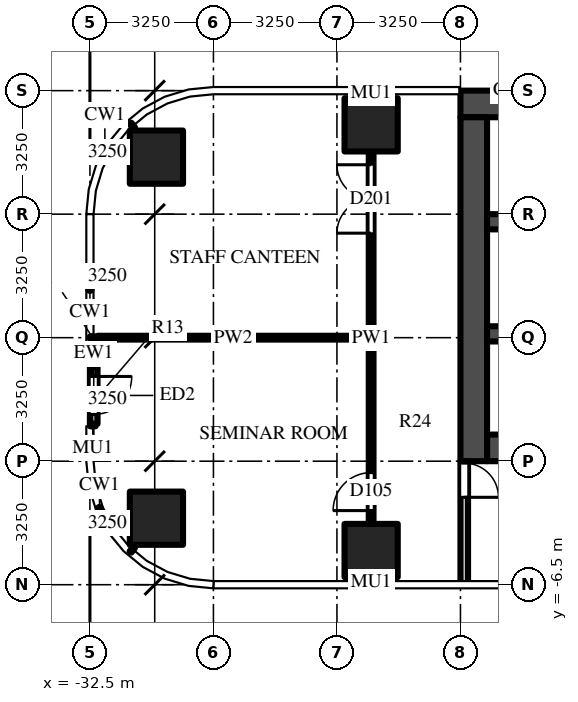
"""IFC4 building model, lengths in metres.
Left out: names, types, materials, properties, quantities, classifications, styles, units other than length and angle.
Written with IfcOpenShell. Run it as: python <this file> out.ifc"""

import sys

from ifc_helpers import new_model, si_unit, direction, frame, frame_2d, origin, origin_2d, place, context, subcontext, project, spatial, rectangle, extrude, source, transform, mapped, element, fill, save


model = new_model("IFC4")
c1 = context("Model", 3, precision=1e-05, world=origin(), true_north=direction((0.0, 1.0)))
c2 = subcontext(c1, "Body", "Model", "MODEL_VIEW")
j1 = project(units=[si_unit("LENGTHUNIT", "METRE"), si_unit("PLANEANGLEUNIT", "RADIAN")], contexts=[c1])
p1 = place(None, origin())
s1 = spatial("IfcSite", under=j1, at=p1, CompositionType="ELEMENT")
p2 = place(p1, origin())
s2 = spatial("IfcBuilding", under=s1, at=p2, CompositionType="ELEMENT")
p3 = place(p2, frame((0.0, 0.0, 34.0)))
s3 = spatial("IfcBuildingStorey", under=s2, at=p3, CompositionType="ELEMENT", Elevation=34.0)
m1 = source(origin(), c2, "Body", "SweptSolid", [
    extrude(rectangle(XDim=1.4, YDim=1.4, at=origin_2d()), origin(), (0.0, 0.0, 1.0), 4.5),
])
for number, where, z_axis, x_axis in (
    (1, (-25.1, -5.6, 0.0), (0.0, 0.0, 1.0), (1.0, 0.0, 0.0)),
    (2, (-30.75, -4.75, 0.0), (0.0, 0.0, 1.0), (1.0, 0.0, 0.0)),
    (3, (-25.1, 5.6, 0.0), (0.0, 0.0, 1.0), (1.0, 0.0, 0.0)),
    (4, (-30.75, 4.75, 0.0), (0.0, 0.0, 1.0), (1.0, 0.0, 0.0)),
):
    element("IfcColumn", number, at=place(p3, frame(where, z_axis=z_axis, x_axis=x_axis)), inside=s3, PredefinedType="COLUMN", context=c2, shape_type="MappedRepresentation", body=[
        mapped(m1, transform((0.0, 0.0, 0.0))),
    ])
m2 = source(origin(), c2, "Body", "SweptSolid", [
    extrude(rectangle(XDim=16.45, YDim=0.7, at=frame_2d((8.225, 0.0))), origin(), (0.0, 0.0, 1.0), 4.25),
])
p4 = place(p3, frame((-6.3, 6.15, 0.0), z_axis=(0.0, 0.0, 1.0), x_axis=(-1.0, 0.0, 0.0)))
e5 = element("IfcWall", 5, at=p4, inside=s3, PredefinedType="SHEAR", context=c2, shape_type="MappedRepresentation", body=[
    mapped(m2, transform((0.0, 0.0, 0.0))),
])
m3 = source(origin(), c2, "Body", "SweptSolid", [
    extrude(rectangle(XDim=14.85, YDim=0.7, at=frame_2d((7.425, 0.0))), origin(), (0.0, 0.0, 1.0), 4.25),
])
p5 = place(p3, frame((-7.2, -2.9, 0.0), z_axis=(0.0, 0.0, 1.0), x_axis=(-1.0, 0.0, 0.0)))
e6 = element("IfcWall", 6, at=p5, inside=s3, PredefinedType="SHEAR", context=c2, shape_type="MappedRepresentation", body=[
    mapped(m3, transform((0.0, 0.0, 0.0))),
])
m4 = source(origin(), c2, "Body", "SweptSolid", [
    extrude(rectangle(XDim=1.3, YDim=2.1, at=frame_2d((0.65, 1.05))), frame((0.0, 0.36, 0.0), z_axis=(0.0, -1.0, 0.0), x_axis=(1.0, 0.0, 0.0)), (0.0, 0.0, 1.0), 0.72),
])
p6 = place(p5, frame((12.2, 0.0, 0.0)))
e7 = element("IfcOpeningElement", 7, at=p6, cuts=e6, PredefinedType="OPENING", context=c2, shape_type="MappedRepresentation", body=[
    mapped(m4, transform((0.0, 0.0, 0.0))),
])
m5 = source(origin(), c2, "Body", "SweptSolid", [
    extrude(rectangle(XDim=1.2, YDim=2.1, at=frame_2d((0.6, 1.05))), frame((0.0, 0.36, 0.0), z_axis=(0.0, -1.0, 0.0), x_axis=(1.0, 0.0, 0.0)), (0.0, 0.0, 1.0), 0.72),
])
p7 = place(p5, frame((9.85, 0.0, 0.0)))
e8 = element("IfcOpeningElement", 8, at=p7, cuts=e6, PredefinedType="OPENING", context=c2, shape_type="MappedRepresentation", body=[
    mapped(m5, transform((0.0, 0.0, 0.0))),
])
m6 = source(origin(), c2, "Body", "SweptSolid", [
    extrude(rectangle(XDim=1.0, YDim=2.1, at=frame_2d((0.5, 1.05))), frame((0.0, 0.36, 0.0), z_axis=(0.0, -1.0, 0.0), x_axis=(1.0, 0.0, 0.0)), (0.0, 0.0, 1.0), 0.72),
])
p8 = place(p5, frame((7.9, 0.0, 0.0)))
e9 = element("IfcOpeningElement", 9, at=p8, cuts=e6, PredefinedType="OPENING", context=c2, shape_type="MappedRepresentation", body=[
    mapped(m6, transform((0.0, 0.0, 0.0))),
])
m7 = source(origin(), c2, "Body", "SweptSolid", [
    extrude(rectangle(XDim=0.9, YDim=2.1, at=frame_2d((0.45, 1.05))), frame((0.0, 0.36, 0.0), z_axis=(0.0, -1.0, 0.0), x_axis=(1.0, 0.0, 0.0)), (0.0, 0.0, 1.0), 0.72),
])
p9 = place(p5, frame((0.65, 0.0, 0.0)))
e10 = element("IfcOpeningElement", 10, at=p9, cuts=e6, PredefinedType="OPENING", context=c2, shape_type="MappedRepresentation", body=[
    mapped(m7, transform((0.0, 0.0, 0.0))),
])
p10 = place(p5, frame((3.25, 0.0, 0.0)))
e11 = element("IfcOpeningElement", 11, at=p10, cuts=e6, PredefinedType="OPENING", context=c2, shape_type="MappedRepresentation", body=[
    mapped(m7, transform((0.0, 0.0, 0.0))),
])
p11 = place(p5, frame((5.8, 0.0, 0.0)))
e12 = element("IfcOpeningElement", 12, at=p11, cuts=e6, PredefinedType="OPENING", context=c2, shape_type="MappedRepresentation", body=[
    mapped(m6, transform((0.0, 0.0, 0.0))),
])
m8 = source(origin(), c2, "Body", "SweptSolid", [
    extrude(rectangle(XDim=9.05, YDim=0.7, at=frame_2d((4.525, 0.0))), origin(), (0.0, 0.0, 1.0), 4.25),
])
p12 = place(p3, frame((-22.4, 5.8, 0.0), z_axis=(0.0, 0.0, 1.0), x_axis=(0.0, -1.0, 0.0)))
e13 = element("IfcWall", 13, at=p12, inside=s3, PredefinedType="SHEAR", context=c2, shape_type="MappedRepresentation", body=[
    mapped(m8, transform((0.0, 0.0, 0.0))),
])
m9 = source(origin(), c2, "Body", "SweptSolid", [
    extrude(rectangle(XDim=14.85, YDim=0.4, at=frame_2d((7.425, 0.0))), origin(), (0.0, 0.0, 1.0), 4.25),
])
p13 = place(p3, frame((-7.2, 0.1, 0.0), z_axis=(0.0, 0.0, 1.0), x_axis=(-1.0, 0.0, 0.0)))
e14 = element("IfcWall", 14, at=p13, inside=s3, PredefinedType="SHEAR", context=c2, shape_type="MappedRepresentation", body=[
    mapped(m9, transform((0.0, 0.0, 0.0))),
])
m10 = source(origin(), c2, "Body", "SweptSolid", [
    extrude(rectangle(XDim=1.0, YDim=2.1, at=frame_2d((0.5, 1.05))), frame((0.0, 0.21, 0.0), z_axis=(0.0, -1.0, 0.0), x_axis=(1.0, 0.0, 0.0)), (0.0, 0.0, 1.0), 0.42),
])
p14 = place(p13, frame((7.9, 0.0, 0.0)))
e15 = element("IfcOpeningElement", 15, at=p14, cuts=e14, PredefinedType="OPENING", context=c2, shape_type="MappedRepresentation", body=[
    mapped(m10, transform((0.0, 0.0, 0.0))),
])
m11 = source(origin(), c2, "Body", "SweptSolid", [
    extrude(rectangle(XDim=5.7, YDim=0.4, at=frame_2d((2.85, 0.0))), origin(), (0.0, 0.0, 1.0), 4.25),
])
p15 = place(p3, frame((-16.35, 3.05, 0.0), z_axis=(0.0, 0.0, 1.0), x_axis=(-1.0, 0.0, 0.0)))
e16 = element("IfcWall", 16, at=p15, inside=s3, PredefinedType="SHEAR", context=c2, shape_type="MappedRepresentation", body=[
    mapped(m11, transform((0.0, 0.0, 0.0))),
])
m12 = source(origin(), c2, "Body", "SweptSolid", [
    extrude(rectangle(XDim=3.25, YDim=0.2, at=frame_2d((1.625, 0.0))), origin(), (0.0, 0.0, 1.0), 4.25),
])
p16 = place(p3, frame((-22.65, -3.25, 0.0), z_axis=(0.0, 0.0, 1.0), x_axis=(0.0, -1.0, 0.0)))
e17 = element("IfcWall", 17, at=p16, inside=s3, PredefinedType="PARTITIONING", context=c2, shape_type="MappedRepresentation", body=[
    mapped(m12, transform((0.0, 0.0, 0.0))),
])
m13 = source(origin(), c2, "Body", "SweptSolid", [
    extrude(rectangle(XDim=0.9, YDim=2.1, at=frame_2d((0.45, 1.05))), frame((0.0, 0.11, 0.0), z_axis=(0.0, -1.0, 0.0), x_axis=(1.0, 0.0, 0.0)), (0.0, 0.0, 1.0), 0.22),
])
p17 = place(p16, frame((0.05, 0.0, 0.0)))
e18 = element("IfcOpeningElement", 18, at=p17, cuts=e17, PredefinedType="OPENING", context=c2, shape_type="MappedRepresentation", body=[
    mapped(m13, transform((0.0, 0.0, 0.0))),
])
m14 = source(origin(), c2, "Body", "SweptSolid", [
    extrude(rectangle(XDim=1.5, YDim=0.2, at=frame_2d((0.75, 0.0))), origin(), (0.0, 0.0, 1.0), 4.25),
])
p18 = place(p3, frame((-32.4, -0.77, 0.0), z_axis=(0.0, 0.0, 1.0), x_axis=(0.0, -1.0, 0.0)))
e19 = element("IfcWall", 19, at=p18, inside=s3, PredefinedType="SOLIDWALL", context=c2, shape_type="MappedRepresentation", body=[
    mapped(m14, transform((0.0, 0.0, 0.0))),
])
m15 = source(origin(), c2, "Body", "SweptSolid", [
    extrude(rectangle(XDim=1.0, YDim=2.4, at=frame_2d((0.5, 1.2))), frame((0.0, 0.11, 0.0), z_axis=(0.0, -1.0, 0.0), x_axis=(1.0, 0.0, 0.0)), (0.0, 0.0, 1.0), 0.22),
])
p19 = place(p18, frame((0.25, 0.0, 0.0)))
e20 = element("IfcOpeningElement", 20, at=p19, cuts=e19, PredefinedType="OPENING", context=c2, shape_type="MappedRepresentation", body=[
    mapped(m15, transform((0.0, 0.0, 0.0))),
])
m16 = source(origin(), c2, "Body", "SweptSolid", [
    extrude(rectangle(XDim=9.8, YDim=0.125, at=frame_2d((4.9, 0.0))), origin(), (0.0, 0.0, 1.0), 3.468),
])
p20 = place(p3, frame((-25.1, -4.9, 0.0), z_axis=(0.0, 0.0, 1.0), x_axis=(0.0, 1.0, 0.0)))
e21 = element("IfcWall", 21, at=p20, inside=s3, PredefinedType="PARTITIONING", context=c2, shape_type="MappedRepresentation", body=[
    mapped(m16, transform((0.0, 0.0, 0.0))),
])
m17 = source(origin(), c2, "Body", "SweptSolid", [
    extrude(rectangle(XDim=1.0, YDim=2.1, at=frame_2d((0.5, 1.05))), frame((0.0, 0.073, 0.0), z_axis=(0.0, -1.0, 0.0), x_axis=(1.0, 0.0, 0.0)), (0.0, 0.0, 1.0), 0.145),
])
p21 = place(p20, frame((0.35, 0.0, 0.0)))
e22 = element("IfcOpeningElement", 22, at=p21, cuts=e21, PredefinedType="OPENING", context=c2, shape_type="MappedRepresentation", body=[
    mapped(m17, transform((0.0, 0.0, 0.0))),
])
m18 = source(origin(), c2, "Body", "SweptSolid", [
    extrude(rectangle(XDim=1.8, YDim=2.1, at=frame_2d((0.9, 1.05))), frame((0.0, 0.073, 0.0), z_axis=(0.0, -1.0, 0.0), x_axis=(1.0, 0.0, 0.0)), (0.0, 0.0, 1.0), 0.145),
])
p22 = place(p20, frame((7.65, 0.0, 0.0)))
e23 = element("IfcOpeningElement", 23, at=p22, cuts=e21, PredefinedType="OPENING", context=c2, shape_type="MappedRepresentation", body=[
    mapped(m18, transform((0.0, 0.0, 0.0))),
])
m19 = source(origin(), c2, "Body", "SweptSolid", [
    extrude(rectangle(XDim=7.137, YDim=0.1, at=frame_2d((3.569, 0.0))), origin(), (0.0, 0.0, 1.0), 3.33),
])
p23 = place(p3, frame((-32.3, 0.0, 0.0), z_axis=(0.0, 0.0, 1.0), x_axis=(1.0, 0.0, 0.0)))
e24 = element("IfcWall", 24, at=p23, inside=s3, PredefinedType="PARTITIONING", context=c2, shape_type="MappedRepresentation", body=[
    mapped(m19, transform((0.0, 0.0, 0.0))),
])
m20 = source(origin(), c2, "Body", "SweptSolid", [
    extrude(rectangle(XDim=0.9, YDim=2.1, at=frame_2d((0.45, 1.05))), frame((0.0, 0.025, 0.0), z_axis=(0.0, -1.0, 0.0), x_axis=(1.0, 0.0, 0.0)), (0.0, 0.0, 1.0), 0.05),
])
p24 = place(p17, origin())
e25 = element("IfcDoor", 25, at=p24, inside=s3, OperationType="SINGLE_SWING_RIGHT", PredefinedType="DOOR", context=c2, shape_type="MappedRepresentation", body=[
    mapped(m20, transform((0.0, 0.0, 0.0))),
])
fill(e18, e25)
m21 = source(origin(), c2, "Body", "SweptSolid", [
    extrude(rectangle(XDim=1.0, YDim=2.4, at=frame_2d((0.5, 1.2))), frame((0.0, 0.025, 0.0), z_axis=(0.0, -1.0, 0.0), x_axis=(1.0, 0.0, 0.0)), (0.0, 0.0, 1.0), 0.05),
])
p25 = place(p19, origin())
e26 = element("IfcDoor", 26, at=p25, inside=s3, OperationType="SINGLE_SWING_LEFT", PredefinedType="DOOR", context=c2, shape_type="MappedRepresentation", body=[
    mapped(m21, transform((0.0, 0.0, 0.0))),
])
fill(e20, e26)
m22 = source(origin(), c2, "Body", "SweptSolid", [
    extrude(rectangle(XDim=1.0, YDim=2.1, at=frame_2d((0.5, 1.05))), frame((0.0, 0.025, 0.0), z_axis=(0.0, -1.0, 0.0), x_axis=(1.0, 0.0, 0.0)), (0.0, 0.0, 1.0), 0.05),
])
p26 = place(p21, origin())
e27 = element("IfcDoor", 27, at=p26, inside=s3, OperationType="SINGLE_SWING_LEFT", PredefinedType="DOOR", context=c2, shape_type="MappedRepresentation", body=[
    mapped(m22, transform((0.0, 0.0, 0.0))),
])
fill(e22, e27)
m23 = source(origin(), c2, "Body", "SweptSolid", [
    extrude(rectangle(XDim=1.8, YDim=2.1, at=frame_2d((0.9, 1.05))), frame((0.0, 0.025, 0.0), z_axis=(0.0, -1.0, 0.0), x_axis=(1.0, 0.0, 0.0)), (0.0, 0.0, 1.0), 0.05),
])
p27 = place(p22, origin())
e28 = element("IfcDoor", 28, at=p27, inside=s3, OperationType="DOUBLE_DOOR_SINGLE_SWING", PredefinedType="DOOR", context=c2, shape_type="MappedRepresentation", body=[
    mapped(m23, transform((0.0, 0.0, 0.0))),
])
fill(e23, e28)
save(model, sys.argv[1])
